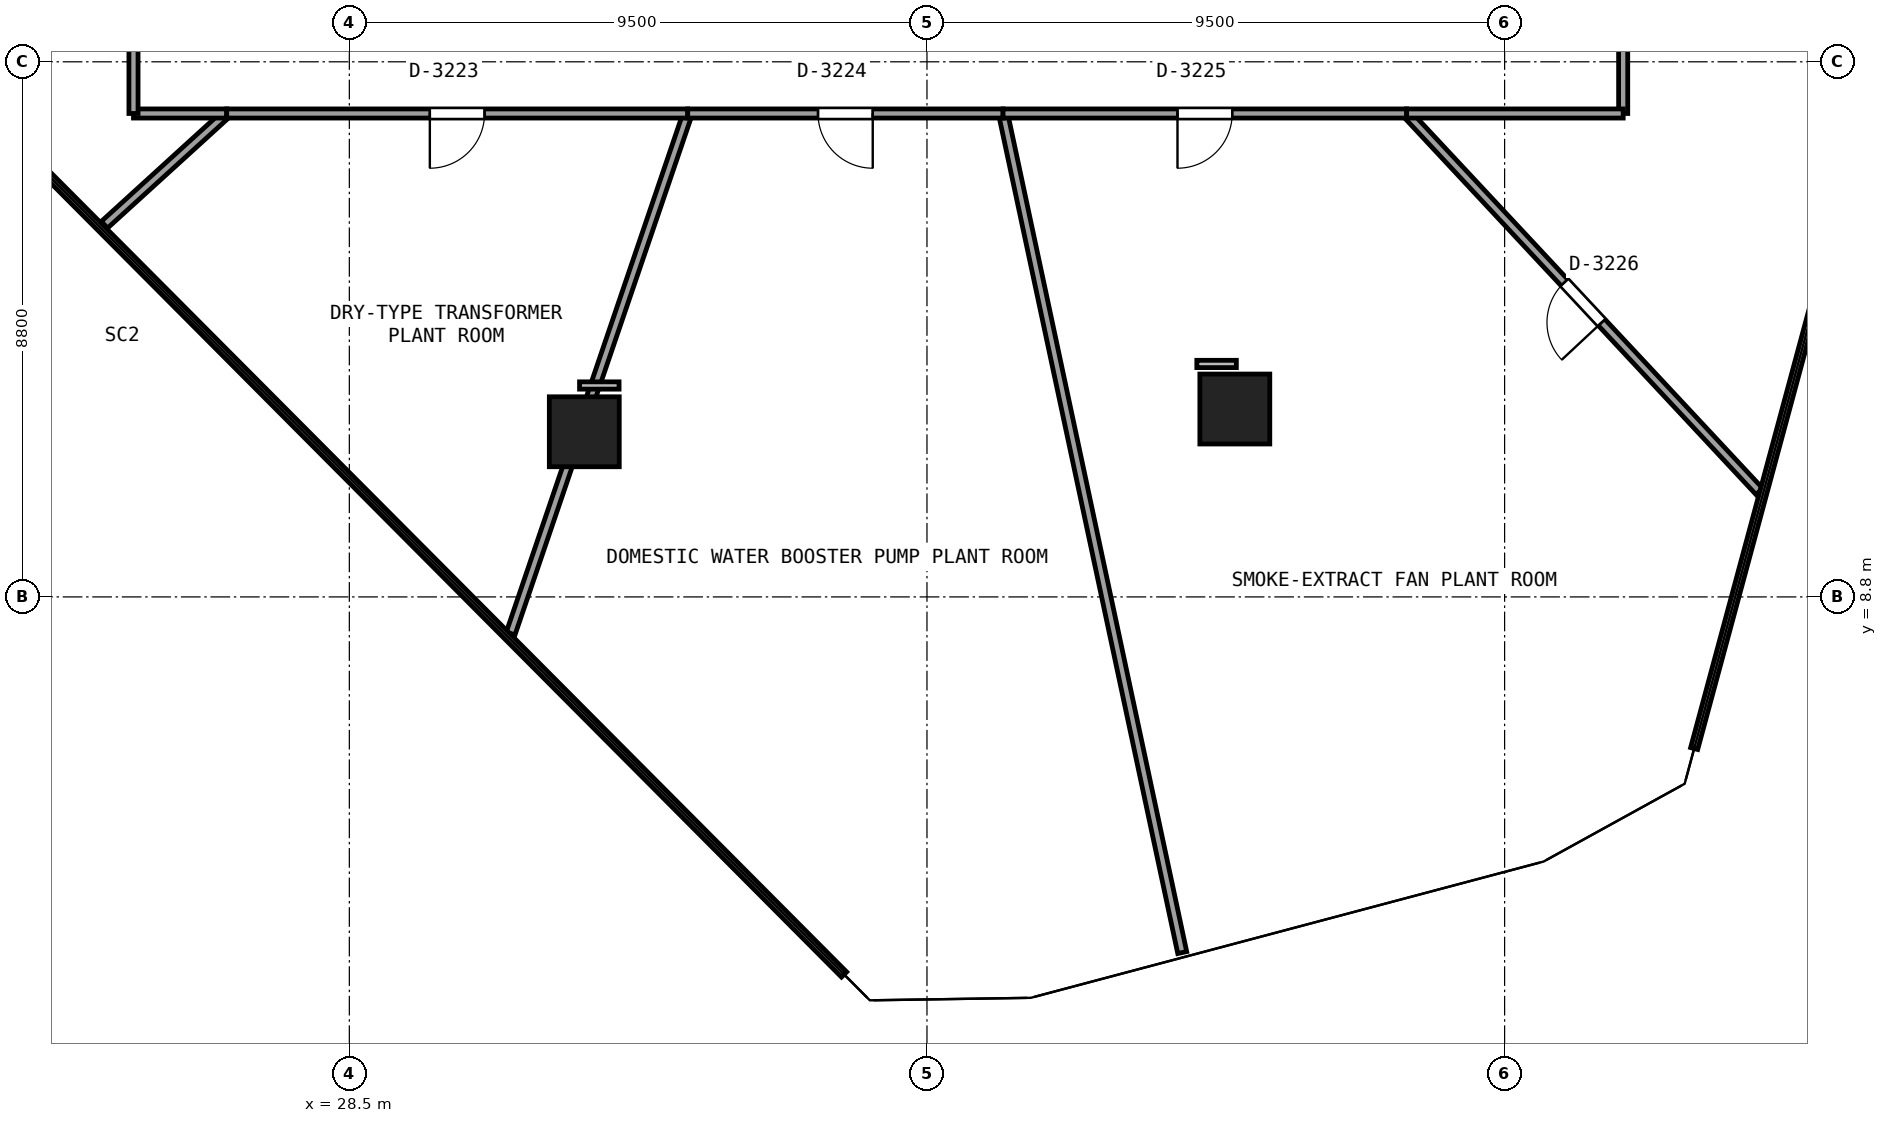
"""IFC4 building model, lengths in metres.
Left out: names, types, materials, properties, quantities, classifications, styles, units other than length and angle.
Written with IfcOpenShell. Run it as: python <this file> out.ifc"""

import sys

from ifc_helpers import new_model, si_unit, direction, frame, frame_2d, origin, origin_2d, place, context, subcontext, project, spatial, rectangle, extrude, element, fill, save


model = new_model("IFC4")
c1 = context("Model", 3, precision=1e-05, world=origin(), true_north=direction((0.0, 1.0)))
c2 = subcontext(c1, "Body", "Model", "MODEL_VIEW")
j1 = project(units=[si_unit("LENGTHUNIT", "METRE"), si_unit("PLANEANGLEUNIT", "RADIAN")], contexts=[c1])
p1 = place(None, origin())
s1 = spatial("IfcSite", under=j1, at=p1, CompositionType="ELEMENT")
p2 = place(p1, origin())
s2 = spatial("IfcBuilding", under=s1, at=p2, CompositionType="ELEMENT")
p3 = place(p2, frame((0.0, 0.0, 121.2)))
s3 = spatial("IfcBuildingStorey", under=s2, at=p3, CompositionType="ELEMENT", Elevation=121.2)
for number, where, z_axis, x_axis in (
    (1, (32.364, 11.516, 0.0), (0.0, 0.0, 1.0), (1.0, 0.0, 0.0)),
    (2, (43.063, 11.89, 0.0), (0.0, 0.0, 1.0), (1.0, 0.0, 0.0)),
):
    element("IfcColumn", number, at=place(p3, frame(where, z_axis=z_axis, x_axis=x_axis)), inside=s3, PredefinedType="COLUMN", context=c2, shape_type="SweptSolid", body=[
        extrude(rectangle(XDim=1.15, YDim=1.15, at=origin_2d()), origin(), (0.0, 0.0, 1.0), 4.08),
    ])
p4 = place(p3, frame((24.472, 14.92, 0.0), z_axis=(0.0, 0.0, 1.0), x_axis=(0.739590569091, 0.673057048185, 0.0)))
e3 = element("IfcWall", 3, at=p4, inside=s3, PredefinedType="PARTITIONING", context=c2, shape_type="SweptSolid", body=[
    extrude(rectangle(XDim=2.719, YDim=0.15, at=frame_2d((1.359, 0.0))), origin(), (0.0, 0.0, 1.0), 3.365),
])
p5 = place(p3, frame((26.483, 16.75, 0.0), z_axis=(0.0, 0.0, 1.0), x_axis=(-1.0, 0.0, 0.0)))
e4 = element("IfcWall", 4, at=p5, inside=s3, PredefinedType="PARTITIONING", context=c2, shape_type="SweptSolid", body=[
    extrude(rectangle(XDim=1.533, YDim=0.15, at=frame_2d((0.767, 0.0))), origin(), (0.0, 0.0, 1.0), 3.365),
])
p6 = place(p3, frame((24.95, 16.75, 0.0), z_axis=(0.0, 0.0, 1.0), x_axis=(0.0, 1.0, 0.0)))
e5 = element("IfcWall", 5, at=p6, inside=s3, PredefinedType="PARTITIONING", context=c2, shape_type="SweptSolid", body=[
    extrude(rectangle(XDim=1.85, YDim=0.15, at=frame_2d((0.925, 0.0))), origin(), (0.0, 0.0, 1.0), 3.365),
])
p7 = place(p3, frame((31.153, 8.199, 0.0), z_axis=(0.0, 0.0, 1.0), x_axis=(0.322350885838, 0.94662025459, 0.0)))
e6 = element("IfcWall", 6, at=p7, inside=s3, PredefinedType="PARTITIONING", context=c2, shape_type="SweptSolid", body=[
    extrude(rectangle(XDim=9.033, YDim=0.15, at=frame_2d((4.517, 0.0))), origin(), (0.0, 0.0, 1.0), 3.065),
])
p8 = place(p3, frame((34.065, 16.75, 0.0), z_axis=(0.0, 0.0, 1.0), x_axis=(-1.0, 0.0, 0.0)))
e7 = element("IfcWall", 7, at=p8, inside=s3, PredefinedType="PARTITIONING", context=c2, shape_type="SweptSolid", body=[
    extrude(rectangle(XDim=7.582, YDim=0.15, at=frame_2d((3.791, 0.0))), origin(), (0.0, 0.0, 1.0), 3.065),
])
p9 = place(p8, frame((3.341, 0.0, 0.0)))
e8 = element("IfcOpeningElement", 8, at=p9, cuts=e7, PredefinedType="OPENING", context=c2, shape_type="SweptSolid", body=[
    extrude(rectangle(XDim=0.9, YDim=2.0, at=frame_2d((0.45, 1.0))), frame((0.0, 0.085, 0.0), z_axis=(0.0, -1.0, 0.0), x_axis=(1.0, 0.0, 0.0)), (0.0, 0.0, 1.0), 0.17),
])
p10 = place(p3, frame((42.198, 2.951, 0.0), z_axis=(0.0, 0.0, 1.0), x_axis=(-0.208856695106, 0.977946256657, 0.0)))
e9 = element("IfcWall", 9, at=p10, inside=s3, PredefinedType="PARTITIONING", context=c2, shape_type="SweptSolid", body=[
    extrude(rectangle(XDim=14.11, YDim=0.15, at=frame_2d((7.055, 0.0))), origin(), (0.0, 0.0, 1.0), 3.365),
])
p11 = place(p3, frame((39.251, 16.75, 0.0), z_axis=(0.0, 0.0, 1.0), x_axis=(-1.0, 0.0, 0.0)))
e10 = element("IfcWall", 10, at=p11, inside=s3, PredefinedType="PARTITIONING", context=c2, shape_type="SweptSolid", body=[
    extrude(rectangle(XDim=5.186, YDim=0.15, at=frame_2d((2.593, 0.0))), origin(), (0.0, 0.0, 1.0), 3.065),
])
p12 = place(p11, frame((2.143, 0.0, 0.0)))
e11 = element("IfcOpeningElement", 11, at=p12, cuts=e10, PredefinedType="OPENING", context=c2, shape_type="SweptSolid", body=[
    extrude(rectangle(XDim=0.9, YDim=2.0, at=frame_2d((0.45, 1.0))), frame((0.0, 0.085, 0.0), z_axis=(0.0, -1.0, 0.0), x_axis=(1.0, 0.0, 0.0)), (0.0, 0.0, 1.0), 0.17),
])
p13 = place(p3, frame((51.69, 10.534, 0.0), z_axis=(0.0, 0.0, 1.0), x_axis=(-0.68227834955, 0.731092506961, 0.0)))
e12 = element("IfcWall", 12, at=p13, inside=s3, PredefinedType="PARTITIONING", context=c2, shape_type="SweptSolid", body=[
    extrude(rectangle(XDim=8.502, YDim=0.15, at=frame_2d((4.251, 0.0))), origin(), (0.0, 0.0, 1.0), 3.365),
])
p14 = place(p13, frame((3.801, 0.0, 0.0)))
e13 = element("IfcOpeningElement", 13, at=p14, cuts=e12, PredefinedType="OPENING", context=c2, shape_type="SweptSolid", body=[
    extrude(rectangle(XDim=0.9, YDim=2.0, at=frame_2d((0.45, 1.0))), frame((0.0, 0.085, 0.0), z_axis=(0.0, -1.0, 0.0), x_axis=(1.0, 0.0, 0.0)), (0.0, 0.0, 1.0), 0.17),
])
p15 = place(p3, frame((45.889, 16.75, 0.0), z_axis=(0.0, 0.0, 1.0), x_axis=(-1.0, 0.0, 0.0)))
e14 = element("IfcWall", 14, at=p15, inside=s3, PredefinedType="PARTITIONING", context=c2, shape_type="SweptSolid", body=[
    extrude(rectangle(XDim=6.638, YDim=0.15, at=frame_2d((3.319, 0.0))), origin(), (0.0, 0.0, 1.0), 3.065),
])
p16 = place(p15, frame((2.869, 0.0, 0.0)))
e15 = element("IfcOpeningElement", 15, at=p16, cuts=e14, PredefinedType="OPENING", context=c2, shape_type="SweptSolid", body=[
    extrude(rectangle(XDim=0.9, YDim=2.0, at=frame_2d((0.45, 1.0))), frame((0.0, 0.085, 0.0), z_axis=(0.0, -1.0, 0.0), x_axis=(1.0, 0.0, 0.0)), (0.0, 0.0, 1.0), 0.17),
])
p17 = place(p3, frame((49.45, 18.6, 0.0), z_axis=(0.0, 0.0, 1.0), x_axis=(0.0, -1.0, 0.0)))
e16 = element("IfcWall", 16, at=p17, inside=s3, PredefinedType="PARTITIONING", context=c2, shape_type="SweptSolid", body=[
    extrude(rectangle(XDim=1.85, YDim=0.15, at=frame_2d((0.925, 0.0))), origin(), (0.0, 0.0, 1.0), 3.365),
])
p18 = place(p3, frame((49.45, 16.75, 0.0), z_axis=(0.0, 0.0, 1.0), x_axis=(-1.0, 0.0, 0.0)))
e17 = element("IfcWall", 17, at=p18, inside=s3, PredefinedType="PARTITIONING", context=c2, shape_type="SweptSolid", body=[
    extrude(rectangle(XDim=3.561, YDim=0.15, at=frame_2d((1.781, 0.0))), origin(), (0.0, 0.0, 1.0), 3.365),
])
p19 = place(p9, origin())
e18 = element("IfcDoor", 18, at=p19, inside=s3, OperationType="SINGLE_SWING_RIGHT", PredefinedType="DOOR", context=c2, shape_type="SweptSolid", body=[
    extrude(rectangle(XDim=0.9, YDim=2.0, at=frame_2d((0.45, 1.0))), frame((0.0, 0.025, 0.0), z_axis=(0.0, -1.0, 0.0), x_axis=(1.0, 0.0, 0.0)), (0.0, 0.0, 1.0), 0.05),
])
fill(e8, e18)
p20 = place(p12, origin())
e19 = element("IfcDoor", 19, at=p20, inside=s3, OperationType="SINGLE_SWING_LEFT", PredefinedType="DOOR", context=c2, shape_type="SweptSolid", body=[
    extrude(rectangle(XDim=0.9, YDim=2.0, at=frame_2d((0.45, 1.0))), frame((0.0, 0.025, 0.0), z_axis=(0.0, -1.0, 0.0), x_axis=(1.0, 0.0, 0.0)), (0.0, 0.0, 1.0), 0.05),
])
fill(e11, e19)
p21 = place(p16, origin())
e20 = element("IfcDoor", 20, at=p21, inside=s3, OperationType="SINGLE_SWING_RIGHT", PredefinedType="DOOR", context=c2, shape_type="SweptSolid", body=[
    extrude(rectangle(XDim=0.9, YDim=2.0, at=frame_2d((0.45, 1.0))), frame((0.0, 0.025, 0.0), z_axis=(0.0, -1.0, 0.0), x_axis=(1.0, 0.0, 0.0)), (0.0, 0.0, 1.0), 0.05),
])
fill(e15, e20)
p22 = place(p14, origin())
e21 = element("IfcDoor", 21, at=p22, inside=s3, OperationType="SINGLE_SWING_LEFT", PredefinedType="DOOR", context=c2, shape_type="SweptSolid", body=[
    extrude(rectangle(XDim=0.9, YDim=2.0, at=frame_2d((0.45, 1.0))), frame((0.0, 0.025, 0.0), z_axis=(0.0, -1.0, 0.0), x_axis=(1.0, 0.0, 0.0)), (0.0, 0.0, 1.0), 0.05),
])
fill(e13, e21)
save(model, sys.argv[1])
